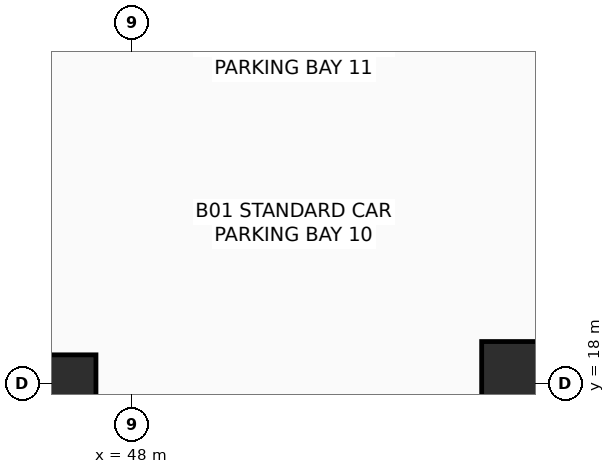
"""IFC4 building model, lengths in metres.
Left out: names, types, materials, properties, quantities, classifications, styles, units other than length and angle.
Written with IfcOpenShell. Run it as: python <this file> out.ifc"""

import sys

from ifc_helpers import new_model, si_unit, direction, frame, origin, origin_2d, place, context, subcontext, project, spatial, rectangle, hollow_rectangle, extrude, element, save


model = new_model("IFC4")
c1 = context("Model", 3, precision=1e-05, world=origin(), true_north=direction((0.0, 1.0)))
c2 = subcontext(c1, "Body", "Model", "MODEL_VIEW")
j1 = project(units=[si_unit("LENGTHUNIT", "METRE"), si_unit("PLANEANGLEUNIT", "RADIAN")], contexts=[c1])
p1 = place(None, origin())
s1 = spatial("IfcSite", under=j1, at=p1, CompositionType="ELEMENT")
p2 = place(p1, origin())
s2 = spatial("IfcBuilding", under=s1, at=p2, CompositionType="ELEMENT")
p3 = place(p2, frame((0.0, 0.0, -4.8)))
s3 = spatial("IfcBuildingStorey", under=s2, at=p3, CompositionType="ELEMENT", Elevation=-4.8)
p4 = place(p3, frame((47.15, 18.0, 0.0), z_axis=(0.0, 0.0, 1.0), x_axis=(1.0, 0.0, 0.0)))
e1 = element("IfcColumn", 1, at=p4, inside=s3, PredefinedType="COLUMN", context=c2, shape_type="SweptSolid", body=[
    extrude(hollow_rectangle(XDim=0.75, YDim=0.75, WallThickness=0.035, InnerFilletRadius=0.035, OuterFilletRadius=0.05, at=origin_2d()), origin(), (0.0, 0.0, 1.0), 4.8),
])
p5 = place(p3, frame((53.15, 18.0, 0.0), z_axis=(0.0, 0.0, 1.0), x_axis=(1.0, 0.0, 0.0)))
e2 = element("IfcColumn", 2, at=p5, inside=s3, PredefinedType="COLUMN", context=c2, shape_type="SweptSolid", body=[
    extrude(rectangle(XDim=1.1, YDim=1.1, at=origin_2d()), origin(), (0.0, 0.0, 1.0), 4.8),
])
save(model, sys.argv[1])
